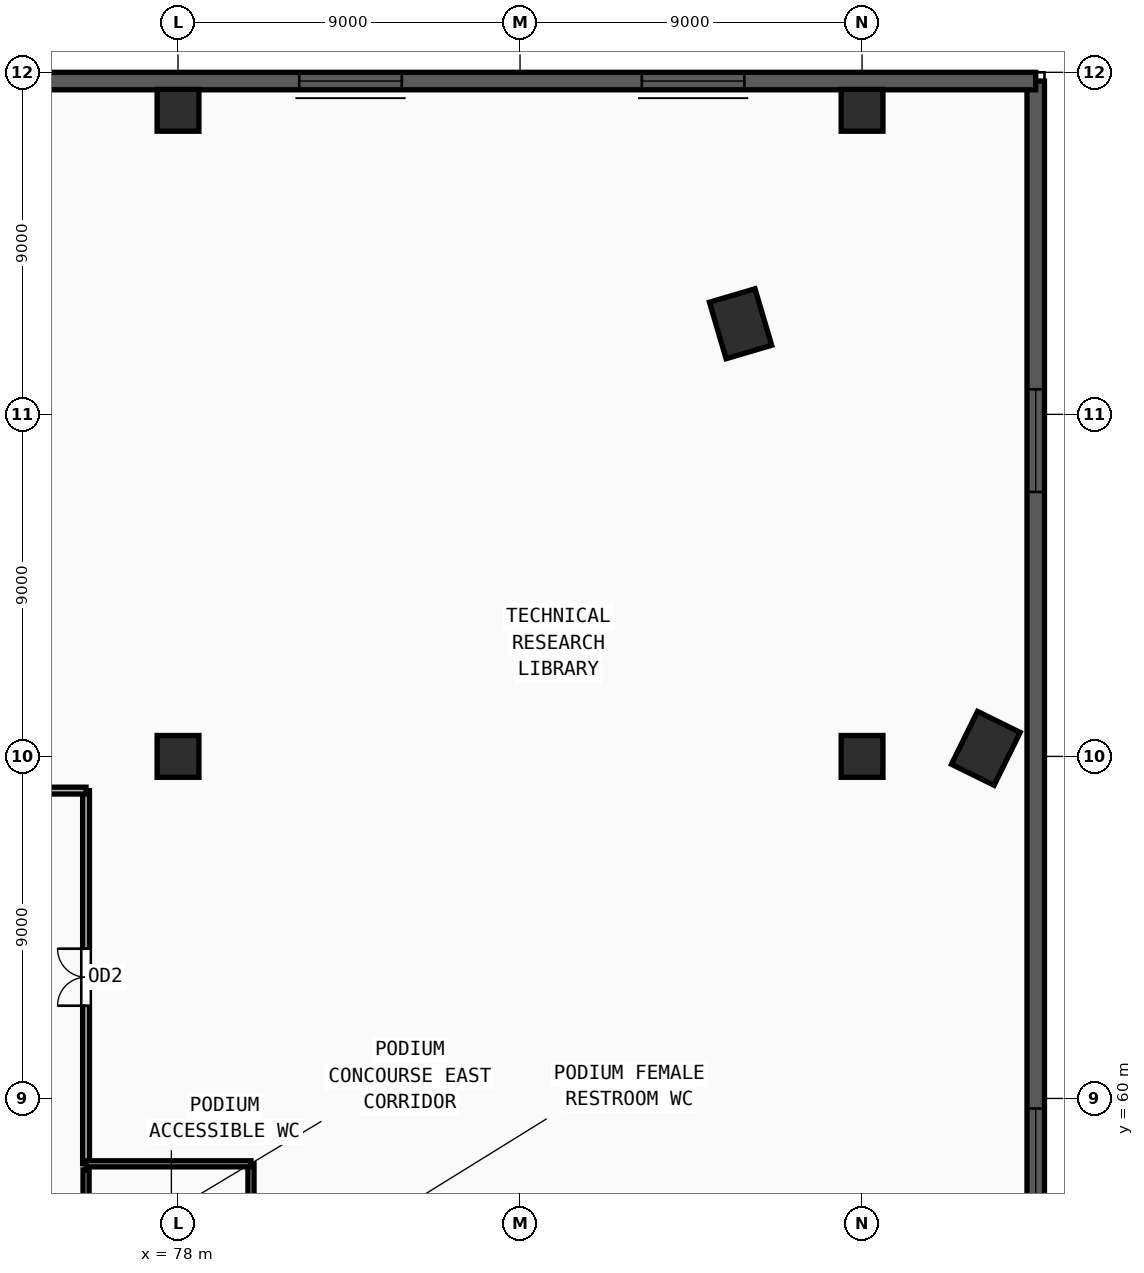
"""IFC4 building model, lengths in metres.
Left out: names, types, materials, properties, quantities, classifications, styles, units other than length and angle.
Written with IfcOpenShell. Run it as: python <this file> out.ifc"""

import sys

from ifc_helpers import new_model, si_unit, direction, frame, frame_2d, origin, origin_2d, place, context, subcontext, project, spatial, rectangle, extrude, source, transform, mapped, element, fill, save


model = new_model("IFC4")
c1 = context("Model", 3, precision=1e-05, world=origin(), true_north=direction((0.0, 1.0)))
c2 = subcontext(c1, "Body", "Model", "MODEL_VIEW")
j1 = project(units=[si_unit("LENGTHUNIT", "METRE"), si_unit("PLANEANGLEUNIT", "RADIAN")], contexts=[c1])
p1 = place(None, origin())
s1 = spatial("IfcSite", under=j1, at=p1, CompositionType="ELEMENT")
p2 = place(p1, origin())
s2 = spatial("IfcBuilding", under=s1, at=p2, CompositionType="ELEMENT")
p3 = place(p2, frame((0.0, 0.0, 14.4)))
s3 = spatial("IfcBuildingStorey", under=s2, at=p3, CompositionType="ELEMENT", Elevation=14.4)
m1 = source(origin(), c2, "Body", "SweptSolid", [
    extrude(rectangle(XDim=1.55, YDim=1.25, at=origin_2d()), origin(), (0.0, 0.0, 1.0), 4.5),
])
for number, where, z_axis, x_axis in (
    (1, (92.803, 80.384, 0.0), (0.0, 0.0, 1.0), (-0.283, 0.959, 0.0)),
    (2, (99.256, 69.212, 0.0), (0.0, 0.0, 1.0), (0.442, 0.897, 0.0)),
):
    element("IfcColumn", number, at=place(p3, frame(where, z_axis=z_axis, x_axis=x_axis)), inside=s3, PredefinedType="COLUMN", context=c2, shape_type="MappedRepresentation", body=[
        mapped(m1, transform((0.0, 0.0, 0.0), x_axis=(1.0, 0.0, 0.0), y_axis=(0.0, 1.0, 0.0), z_axis=(0.0, 0.0, 1.0), scale=1.0)),
    ])
m2 = source(origin(), c2, "Body", "SweptSolid", [
    extrude(rectangle(XDim=1.1, YDim=1.1, at=origin_2d()), origin(), (0.0, 0.0, 1.0), 4.5),
])
for number, where, z_axis, x_axis in (
    (3, (78.0, 69.0, 0.0), (0.0, 0.0, 1.0), (1.0, 0.0, 0.0)),
    (4, (96.0, 69.0, 0.0), (0.0, 0.0, 1.0), (1.0, 0.0, 0.0)),
    (5, (78.0, 86.0, 0.0), (0.0, 0.0, 1.0), (1.0, 0.0, 0.0)),
    (6, (96.0, 86.0, 0.0), (0.0, 0.0, 1.0), (1.0, 0.0, 0.0)),
):
    element("IfcColumn", number, at=place(p3, frame(where, z_axis=z_axis, x_axis=x_axis)), inside=s3, PredefinedType="COLUMN", context=c2, shape_type="MappedRepresentation", body=[
        mapped(m2, transform((0.0, 0.0, 0.0), x_axis=(1.0, 0.0, 0.0), y_axis=(0.0, 1.0, 0.0), z_axis=(0.0, 0.0, 1.0), scale=1.0)),
    ])
p4 = place(p3, frame((100.57, 20.54, 0.0), z_axis=(0.0, 0.0, 1.0), x_axis=(0.0, 1.0, 0.0)))
e7 = element("IfcWall", 7, at=p4, inside=s3, PredefinedType="SOLIDWALL", context=c2, shape_type="SweptSolid", body=[
    extrude(rectangle(XDim=66.23, YDim=0.46, at=frame_2d((33.115, 0.0))), origin(), (0.0, 0.0, 1.0), 4.25),
])
m3 = source(origin(), c2, "Body", "SweptSolid", [
    extrude(rectangle(XDim=2.7, YDim=2.35, at=frame_2d((1.35, 1.175))), frame((0.0, 0.24, 0.0), z_axis=(0.0, -1.0, 0.0), x_axis=(1.0, 0.0, 0.0)), (0.0, 0.0, 1.0), 0.48),
])
p5 = place(p4, frame((8.111, 0.0, 0.55)))
e8 = element("IfcOpeningElement", 8, at=p5, cuts=e7, PredefinedType="OPENING", context=c2, shape_type="MappedRepresentation", body=[
    mapped(m3, transform((0.0, 0.0, 0.0), x_axis=(1.0, 0.0, 0.0), y_axis=(0.0, 1.0, 0.0), z_axis=(0.0, 0.0, 1.0), scale=1.0)),
])
p6 = place(p4, frame((17.573, 0.0, 0.55)))
e9 = element("IfcOpeningElement", 9, at=p6, cuts=e7, PredefinedType="OPENING", context=c2, shape_type="MappedRepresentation", body=[
    mapped(m3, transform((0.0, 0.0, 0.0), x_axis=(1.0, 0.0, 0.0), y_axis=(0.0, 1.0, 0.0), z_axis=(0.0, 0.0, 1.0), scale=1.0)),
])
p7 = place(p4, frame((27.034, 0.0, 0.55)))
e10 = element("IfcOpeningElement", 10, at=p7, cuts=e7, PredefinedType="OPENING", context=c2, shape_type="MappedRepresentation", body=[
    mapped(m3, transform((0.0, 0.0, 0.0), x_axis=(1.0, 0.0, 0.0), y_axis=(0.0, 1.0, 0.0), z_axis=(0.0, 0.0, 1.0), scale=1.0)),
])
p8 = place(p4, frame((36.496, 0.0, 0.55)))
e11 = element("IfcOpeningElement", 11, at=p8, cuts=e7, PredefinedType="OPENING", context=c2, shape_type="MappedRepresentation", body=[
    mapped(m3, transform((0.0, 0.0, 0.0), x_axis=(1.0, 0.0, 0.0), y_axis=(0.0, 1.0, 0.0), z_axis=(0.0, 0.0, 1.0), scale=1.0)),
])
p9 = place(p4, frame((55.419, 0.0, 0.55)))
e12 = element("IfcOpeningElement", 12, at=p9, cuts=e7, PredefinedType="OPENING", context=c2, shape_type="MappedRepresentation", body=[
    mapped(m3, transform((0.0, 0.0, 0.0), x_axis=(1.0, 0.0, 0.0), y_axis=(0.0, 1.0, 0.0), z_axis=(0.0, 0.0, 1.0), scale=1.0)),
])
p10 = place(p3, frame((100.57, 86.77, 0.0), z_axis=(0.0, 0.0, 1.0), x_axis=(-1.0, 0.0, 0.0)))
e13 = element("IfcWall", 13, at=p10, inside=s3, PredefinedType="SOLIDWALL", context=c2, shape_type="SweptSolid", body=[
    extrude(rectangle(XDim=81.14, YDim=0.46, at=frame_2d((40.57, 0.0))), origin(), (0.0, 0.0, 1.0), 4.25),
])
p11 = place(p10, frame((7.666, 0.0, 0.55)))
e14 = element("IfcOpeningElement", 14, at=p11, cuts=e13, PredefinedType="OPENING", context=c2, shape_type="MappedRepresentation", body=[
    mapped(m3, transform((0.0, 0.0, 0.0), x_axis=(1.0, 0.0, 0.0), y_axis=(0.0, 1.0, 0.0), z_axis=(0.0, 0.0, 1.0), scale=1.0)),
])
p12 = place(p10, frame((16.681, 0.0, 0.55)))
e15 = element("IfcOpeningElement", 15, at=p12, cuts=e13, PredefinedType="OPENING", context=c2, shape_type="MappedRepresentation", body=[
    mapped(m3, transform((0.0, 0.0, 0.0), x_axis=(1.0, 0.0, 0.0), y_axis=(0.0, 1.0, 0.0), z_axis=(0.0, 0.0, 1.0), scale=1.0)),
])
p13 = place(p10, frame((34.712, 0.0, 0.55)))
e16 = element("IfcOpeningElement", 16, at=p13, cuts=e13, PredefinedType="OPENING", context=c2, shape_type="MappedRepresentation", body=[
    mapped(m3, transform((0.0, 0.0, 0.0), x_axis=(1.0, 0.0, 0.0), y_axis=(0.0, 1.0, 0.0), z_axis=(0.0, 0.0, 1.0), scale=1.0)),
])
p14 = place(p10, frame((43.728, 0.0, 0.55)))
e17 = element("IfcOpeningElement", 17, at=p14, cuts=e13, PredefinedType="OPENING", context=c2, shape_type="MappedRepresentation", body=[
    mapped(m3, transform((0.0, 0.0, 0.0), x_axis=(1.0, 0.0, 0.0), y_axis=(0.0, 1.0, 0.0), z_axis=(0.0, 0.0, 1.0), scale=1.0)),
])
p15 = place(p10, frame((61.759, 0.0, 0.55)))
e18 = element("IfcOpeningElement", 18, at=p15, cuts=e13, PredefinedType="OPENING", context=c2, shape_type="MappedRepresentation", body=[
    mapped(m3, transform((0.0, 0.0, 0.0), x_axis=(1.0, 0.0, 0.0), y_axis=(0.0, 1.0, 0.0), z_axis=(0.0, 0.0, 1.0), scale=1.0)),
])
p16 = place(p10, frame((70.774, 0.0, 0.55)))
e19 = element("IfcOpeningElement", 19, at=p16, cuts=e13, PredefinedType="OPENING", context=c2, shape_type="MappedRepresentation", body=[
    mapped(m3, transform((0.0, 0.0, 0.0), x_axis=(1.0, 0.0, 0.0), y_axis=(0.0, 1.0, 0.0), z_axis=(0.0, 0.0, 1.0), scale=1.0)),
])
p17 = place(p3, frame((75.58, 55.28, 0.0), z_axis=(0.0, 0.0, 1.0), x_axis=(0.0, 1.0, 0.0)))
e20 = element("IfcWall", 20, at=p17, inside=s3, PredefinedType="PARTITIONING", context=c2, shape_type="SweptSolid", body=[
    extrude(rectangle(XDim=2.84, YDim=0.16, at=frame_2d((1.42, 0.0))), origin(), (0.0, 0.0, 1.0), 4.25),
])
m4 = source(origin(), c2, "Body", "SweptSolid", [
    extrude(rectangle(XDim=1.05, YDim=2.15, at=frame_2d((0.525, 1.075))), frame((0.0, 0.09, 0.0), z_axis=(0.0, -1.0, 0.0), x_axis=(1.0, 0.0, 0.0)), (0.0, 0.0, 1.0), 0.18),
])
p18 = place(p17, frame((0.895, 0.0, 0.0)))
e21 = element("IfcOpeningElement", 21, at=p18, cuts=e20, PredefinedType="OPENING", context=c2, shape_type="MappedRepresentation", body=[
    mapped(m4, transform((0.0, 0.0, 0.0), x_axis=(1.0, 0.0, 0.0), y_axis=(0.0, 1.0, 0.0), z_axis=(0.0, 0.0, 1.0), scale=1.0)),
])
p19 = place(p3, frame((75.58, 58.28, 0.0), z_axis=(0.0, 0.0, 1.0), x_axis=(0.0, 1.0, 0.0)))
e22 = element("IfcWall", 22, at=p19, inside=s3, PredefinedType="PARTITIONING", context=c2, shape_type="SweptSolid", body=[
    extrude(rectangle(XDim=9.82, YDim=0.18, at=frame_2d((4.91, 0.0))), origin(), (0.0, 0.0, 1.0), 4.25),
])
m5 = source(origin(), c2, "Body", "SweptSolid", [
    extrude(rectangle(XDim=1.5, YDim=2.2, at=frame_2d((0.75, 1.1))), frame((0.0, 0.1, 0.0), z_axis=(0.0, -1.0, 0.0), x_axis=(1.0, 0.0, 0.0)), (0.0, 0.0, 1.0), 0.2),
])
p20 = place(p19, frame((4.16, 0.0, 0.0)))
e23 = element("IfcOpeningElement", 23, at=p20, cuts=e22, PredefinedType="OPENING", context=c2, shape_type="MappedRepresentation", body=[
    mapped(m5, transform((0.0, 0.0, 0.0), x_axis=(1.0, 0.0, 0.0), y_axis=(0.0, 1.0, 0.0), z_axis=(0.0, 0.0, 1.0), scale=1.0)),
])
p21 = place(p3, frame((79.92, 47.92, 0.0), z_axis=(0.0, 0.0, 1.0), x_axis=(0.0, 1.0, 0.0)))
e24 = element("IfcWall", 24, at=p21, inside=s3, PredefinedType="PARTITIONING", context=c2, shape_type="SweptSolid", body=[
    extrude(rectangle(XDim=10.36, YDim=0.16, at=frame_2d((5.18, 0.0))), origin(), (0.0, 0.0, 1.0), 4.25),
])
p22 = place(p3, frame((75.58, 58.28, 0.0), z_axis=(0.0, 0.0, 1.0), x_axis=(1.0, 0.0, 0.0)))
e25 = element("IfcWall", 25, at=p22, inside=s3, PredefinedType="PARTITIONING", context=c2, shape_type="SweptSolid", body=[
    extrude(rectangle(XDim=4.34, YDim=0.16, at=frame_2d((2.17, 0.0))), origin(), (0.0, 0.0, 1.0), 4.25),
])
p23 = place(p3, frame((71.7, 68.1, 0.0), z_axis=(0.0, 0.0, 1.0), x_axis=(1.0, 0.0, 0.0)))
e26 = element("IfcWall", 26, at=p23, inside=s3, PredefinedType="PARTITIONING", context=c2, shape_type="SweptSolid", body=[
    extrude(rectangle(XDim=3.88, YDim=0.18, at=frame_2d((1.94, 0.0))), origin(), (0.0, 0.0, 1.0), 4.25),
])
m6 = source(origin(), c2, "Body", "SweptSolid", [
    extrude(rectangle(XDim=2.7, YDim=2.35, at=frame_2d((1.35, 1.175))), frame((0.0, 0.03, 0.0), z_axis=(0.0, -1.0, 0.0), x_axis=(1.0, 0.0, 0.0)), (0.0, 0.0, 1.0), 0.06),
])
p24 = place(p8, origin())
e27 = element("IfcWindow", 27, at=p24, inside=s3, PartitioningType="TRIPLE_PANEL_VERTICAL", PredefinedType="WINDOW", context=c2, shape_type="MappedRepresentation", body=[
    mapped(m6, transform((0.0, 0.0, 0.0), x_axis=(1.0, 0.0, 0.0), y_axis=(0.0, 1.0, 0.0), z_axis=(0.0, 0.0, 1.0), scale=1.0)),
])
fill(e11, e27)
p25 = place(p9, origin())
e28 = element("IfcWindow", 28, at=p25, inside=s3, PartitioningType="TRIPLE_PANEL_VERTICAL", PredefinedType="WINDOW", context=c2, shape_type="MappedRepresentation", body=[
    mapped(m6, transform((0.0, 0.0, 0.0), x_axis=(1.0, 0.0, 0.0), y_axis=(0.0, 1.0, 0.0), z_axis=(0.0, 0.0, 1.0), scale=1.0)),
])
fill(e12, e28)
p26 = place(p11, origin())
e29 = element("IfcWindow", 29, at=p26, inside=s3, PartitioningType="TRIPLE_PANEL_VERTICAL", PredefinedType="WINDOW", context=c2, shape_type="MappedRepresentation", body=[
    mapped(m6, transform((0.0, 0.0, 0.0), x_axis=(1.0, 0.0, 0.0), y_axis=(0.0, 1.0, 0.0), z_axis=(0.0, 0.0, 1.0), scale=1.0)),
])
fill(e14, e29)
p27 = place(p12, origin())
e30 = element("IfcWindow", 30, at=p27, inside=s3, PartitioningType="TRIPLE_PANEL_VERTICAL", PredefinedType="WINDOW", context=c2, shape_type="MappedRepresentation", body=[
    mapped(m6, transform((0.0, 0.0, 0.0), x_axis=(1.0, 0.0, 0.0), y_axis=(0.0, 1.0, 0.0), z_axis=(0.0, 0.0, 1.0), scale=1.0)),
])
fill(e15, e30)
m7 = source(origin(), c2, "Body", "SweptSolid", [
    extrude(rectangle(XDim=1.5, YDim=2.2, at=frame_2d((0.75, 1.1))), frame((0.0, 0.025, 0.0), z_axis=(0.0, -1.0, 0.0), x_axis=(1.0, 0.0, 0.0)), (0.0, 0.0, 1.0), 0.05),
])
p28 = place(p20, origin())
e31 = element("IfcDoor", 31, at=p28, inside=s3, OperationType="DOUBLE_DOOR_SINGLE_SWING", PredefinedType="DOOR", context=c2, shape_type="MappedRepresentation", body=[
    mapped(m7, transform((0.0, 0.0, 0.0), x_axis=(1.0, 0.0, 0.0), y_axis=(0.0, 1.0, 0.0), z_axis=(0.0, 0.0, 1.0), scale=1.0)),
])
fill(e23, e31)
save(model, sys.argv[1])
